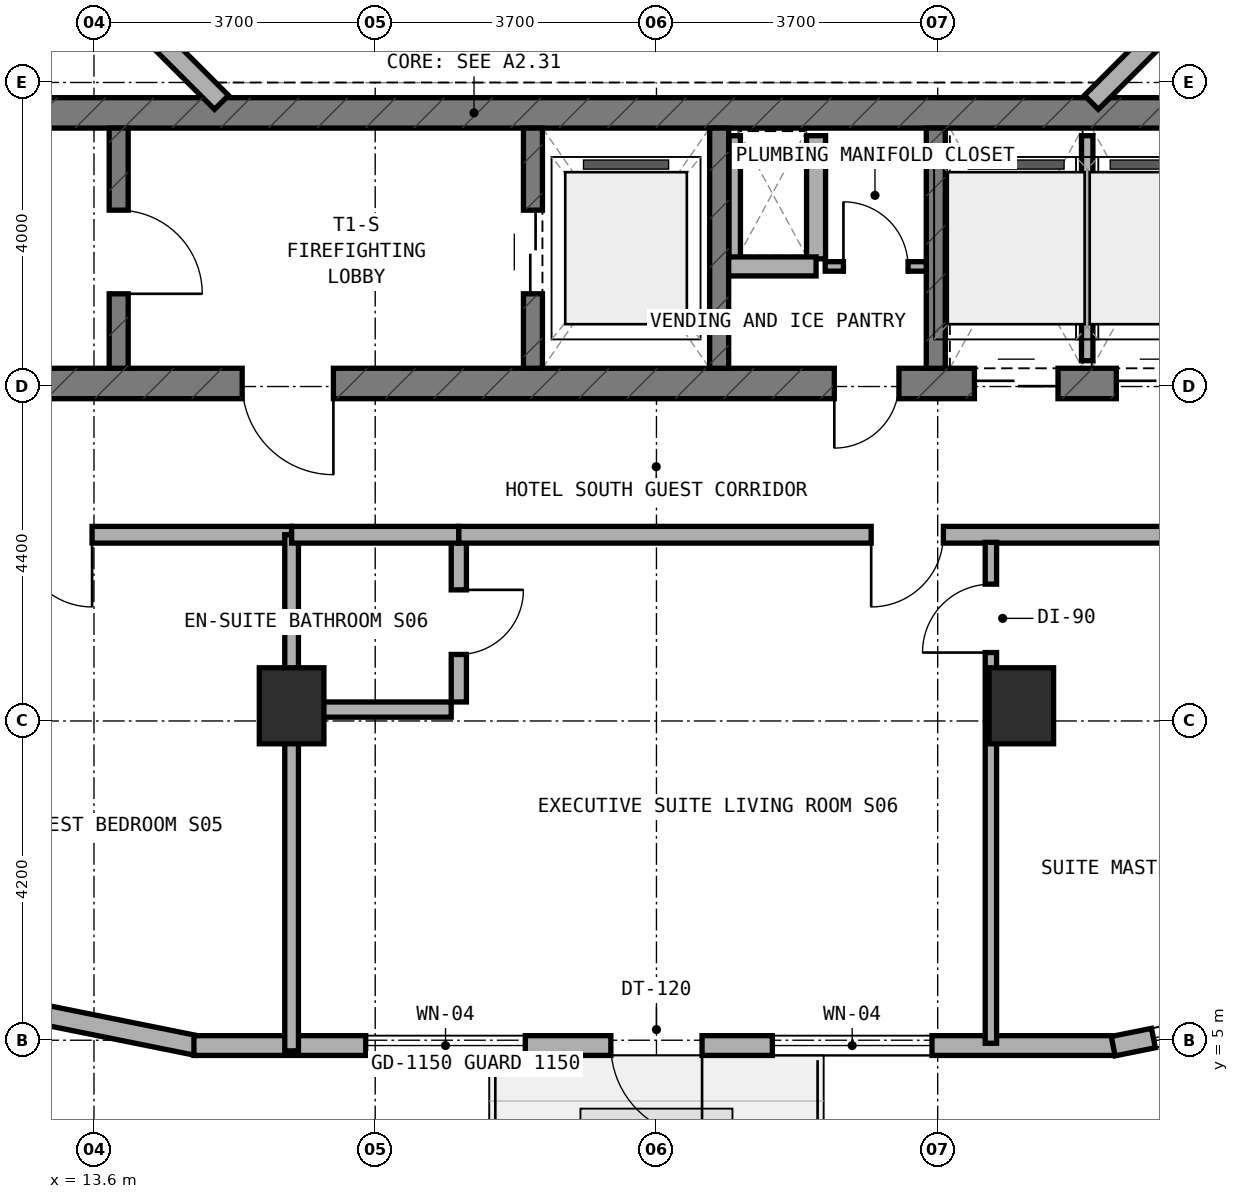
"""IFC4 building model, lengths in metres.
Left out: names, types, materials, properties, quantities, classifications, styles, units other than length and angle.
Written with IfcOpenShell. Run it as: python <this file> out.ifc"""

import sys

from ifc_helpers import new_model, si_unit, direction, frame, frame_2d, origin, origin_2d, place, context, subcontext, project, spatial, rectangle, extrude, element, fill, save


model = new_model("IFC4")
c1 = context("Model", 3, precision=1e-05, world=origin(), true_north=direction((0.0, 1.0)))
c2 = subcontext(c1, "Body", "Model", "MODEL_VIEW")
j1 = project(units=[si_unit("LENGTHUNIT", "METRE"), si_unit("PLANEANGLEUNIT", "RADIAN")], contexts=[c1])
p1 = place(None, origin())
s1 = spatial("IfcSite", under=j1, at=p1, CompositionType="ELEMENT")
p2 = place(p1, origin())
s2 = spatial("IfcBuilding", under=s1, at=p2, CompositionType="ELEMENT")
p3 = place(p2, frame((0.0, 0.0, 134.5)))
s3 = spatial("IfcBuildingStorey", under=s2, at=p3, CompositionType="ELEMENT", Elevation=134.5)
p4 = place(p3, frame((6.4, 13.64, 0.0), z_axis=(0.0, 0.0, 1.0), x_axis=(1.0, 0.0, 0.0)))
e1 = element("IfcWall", 1, at=p4, inside=s3, PredefinedType="SHEAR", context=c2, shape_type="SweptSolid", body=[
    extrude(rectangle(XDim=24.4, YDim=0.4, at=frame_2d((12.2, 0.0))), origin(), (0.0, 0.0, 1.0), 3.5),
])
p5 = place(p4, frame((9.15, 0.0, 0.0)))
e2 = element("IfcOpeningElement", 2, at=p5, cuts=e1, PredefinedType="OPENING", context=c2, shape_type="SweptSolid", body=[
    extrude(rectangle(XDim=1.2, YDim=2.15, at=frame_2d((0.6, 1.075))), frame((0.0, 0.21, 0.0), z_axis=(0.0, -1.0, 0.0), x_axis=(1.0, 0.0, 0.0)), (0.0, 0.0, 1.0), 0.42),
])
p6 = place(p4, frame((16.94, 0.0, 0.0)))
e3 = element("IfcOpeningElement", 3, at=p6, cuts=e1, PredefinedType="OPENING", context=c2, shape_type="SweptSolid", body=[
    extrude(rectangle(XDim=0.85, YDim=2.1, at=frame_2d((0.425, 1.05))), frame((0.0, 0.21, 0.0), z_axis=(0.0, -1.0, 0.0), x_axis=(1.0, 0.0, 0.0)), (0.0, 0.0, 1.0), 0.42),
])
p7 = place(p4, frame((18.783, 0.0, 0.0)))
e4 = element("IfcOpeningElement", 4, at=p7, cuts=e1, PredefinedType="OPENING", context=c2, shape_type="SweptSolid", body=[
    extrude(rectangle(XDim=1.1, YDim=2.15, at=frame_2d((0.55, 1.075))), frame((0.0, 0.21, 0.0), z_axis=(0.0, -1.0, 0.0), x_axis=(1.0, 0.0, 0.0)), (0.0, 0.0, 1.0), 0.42),
])
p8 = place(p4, frame((20.65, 0.0, 0.0)))
e5 = element("IfcOpeningElement", 5, at=p8, cuts=e1, PredefinedType="OPENING", context=c2, shape_type="SweptSolid", body=[
    extrude(rectangle(XDim=1.1, YDim=2.15, at=frame_2d((0.55, 1.075))), frame((0.0, 0.21, 0.0), z_axis=(0.0, -1.0, 0.0), x_axis=(1.0, 0.0, 0.0)), (0.0, 0.0, 1.0), 0.42),
])
p9 = place(p4, frame((22.517, 0.0, 0.0)))
e6 = element("IfcOpeningElement", 6, at=p9, cuts=e1, PredefinedType="OPENING", context=c2, shape_type="SweptSolid", body=[
    extrude(rectangle(XDim=1.1, YDim=2.15, at=frame_2d((0.55, 1.075))), frame((0.0, 0.21, 0.0), z_axis=(0.0, -1.0, 0.0), x_axis=(1.0, 0.0, 0.0)), (0.0, 0.0, 1.0), 0.42),
])
p10 = place(p3, frame((6.4, 17.2, 0.0), z_axis=(0.0, 0.0, 1.0), x_axis=(1.0, 0.0, 0.0)))
e7 = element("IfcWall", 7, at=p10, inside=s3, PredefinedType="SHEAR", context=c2, shape_type="SweptSolid", body=[
    extrude(rectangle(XDim=24.4, YDim=0.4, at=frame_2d((12.2, 0.0))), origin(), (0.0, 0.0, 1.0), 3.5),
])
p11 = place(p3, frame((13.925, 13.84, 0.0), z_axis=(0.0, 0.0, 1.0), x_axis=(0.0, 1.0, 0.0)))
e8 = element("IfcWall", 8, at=p11, inside=s3, PredefinedType="STANDARD", context=c2, shape_type="SweptSolid", body=[
    extrude(rectangle(XDim=3.16, YDim=0.25, at=frame_2d((1.58, 0.0))), origin(), (0.0, 0.0, 1.0), 3.22),
])
p12 = place(p11, frame((0.98, 0.0, 0.0)))
e9 = element("IfcOpeningElement", 9, at=p12, cuts=e8, PredefinedType="OPENING", context=c2, shape_type="SweptSolid", body=[
    extrude(rectangle(XDim=1.1, YDim=2.15, at=frame_2d((0.55, 1.075))), frame((0.0, 0.135, 0.0), z_axis=(0.0, -1.0, 0.0), x_axis=(1.0, 0.0, 0.0)), (0.0, 0.0, 1.0), 0.27),
])
p13 = place(p3, frame((19.375, 13.84, 0.0), z_axis=(0.0, 0.0, 1.0), x_axis=(0.0, 1.0, 0.0)))
e10 = element("IfcWall", 10, at=p13, inside=s3, PredefinedType="STANDARD", context=c2, shape_type="SweptSolid", body=[
    extrude(rectangle(XDim=3.16, YDim=0.25, at=frame_2d((1.58, 0.0))), origin(), (0.0, 0.0, 1.0), 3.22),
])
p14 = place(p13, frame((0.98, 0.0, 0.0)))
e11 = element("IfcOpeningElement", 11, at=p14, cuts=e10, PredefinedType="OPENING", context=c2, shape_type="SweptSolid", body=[
    extrude(rectangle(XDim=1.1, YDim=2.15, at=frame_2d((0.55, 1.075))), frame((0.0, 0.135, 0.0), z_axis=(0.0, -1.0, 0.0), x_axis=(1.0, 0.0, 0.0)), (0.0, 0.0, 1.0), 0.27),
])
for number, where, z_axis, x_axis in (
    (12, (21.825, 13.84, 0.0), (0.0, 0.0, 1.0), (0.0, 1.0, 0.0)),
    (13, (24.675, 13.84, 0.0), (0.0, 0.0, 1.0), (0.0, 1.0, 0.0)),
):
    element("IfcWall", number, at=place(p3, frame(where, z_axis=z_axis, x_axis=x_axis)), inside=s3, PredefinedType="STANDARD", context=c2, shape_type="SweptSolid", body=[
        extrude(rectangle(XDim=3.16, YDim=0.25, at=frame_2d((1.58, 0.0))), origin(), (0.0, 0.0, 1.0), 3.22),
    ])
for number, where, z_axis, x_axis in (
    (14, (16.2, 9.4, 0.0), (0.0, 0.0, 1.0), (1.0, 0.0, 0.0)),
    (15, (25.8, 9.4, 0.0), (0.0, 0.0, 1.0), (1.0, 0.0, 0.0)),
):
    element("IfcColumn", number, at=place(p3, frame(where, z_axis=z_axis, x_axis=x_axis)), inside=s3, PredefinedType="COLUMN", context=c2, shape_type="SweptSolid", body=[
        extrude(rectangle(XDim=0.85, YDim=1.0, at=origin_2d()), origin(), (0.0, 0.0, 1.0), 3.5),
    ])
p15 = place(p3, frame((6.018, 6.729, 0.0), z_axis=(0.0, 0.0, 1.0), x_axis=(0.980317172899, -0.197429077186, 0.0)))
e16 = element("IfcWall", 16, at=p15, inside=s3, PredefinedType="STANDARD", context=c2, shape_type="SweptSolid", body=[
    extrude(rectangle(XDim=9.117, YDim=0.26, at=frame_2d((4.559, 0.0))), origin(), (0.0, 0.0, 1.0), 3.22),
])
p16 = place(p15, frame((4.455, 0.0, 0.85)))
e17 = element("IfcOpeningElement", 17, at=p16, cuts=e16, PredefinedType="OPENING", context=c2, shape_type="SweptSolid", body=[
    extrude(rectangle(XDim=2.1, YDim=1.5, at=frame_2d((1.05, 0.75))), frame((0.0, 0.14, 0.0), z_axis=(0.0, -1.0, 0.0), x_axis=(1.0, 0.0, 0.0)), (0.0, 0.0, 1.0), 0.28),
])
p17 = place(p3, frame((14.915, 4.93, 0.0), z_axis=(0.0, 0.0, 1.0), x_axis=(1.0, 0.0, 0.0)))
e18 = element("IfcWall", 18, at=p17, inside=s3, PredefinedType="STANDARD", context=c2, shape_type="SweptSolid", body=[
    extrude(rectangle(XDim=12.135, YDim=0.26, at=frame_2d((6.067, 0.0))), origin(), (0.0, 0.0, 1.0), 3.22),
])
p18 = place(p17, frame((5.485, 0.0, 0.0)))
e19 = element("IfcOpeningElement", 19, at=p18, cuts=e18, PredefinedType="OPENING", context=c2, shape_type="SweptSolid", body=[
    extrude(rectangle(XDim=1.2, YDim=2.15, at=frame_2d((0.6, 1.075))), frame((0.0, 0.14, 0.0), z_axis=(0.0, -1.0, 0.0), x_axis=(1.0, 0.0, 0.0)), (0.0, 0.0, 1.0), 0.28),
])
p19 = place(p17, frame((2.26, 0.0, 0.85)))
e20 = element("IfcOpeningElement", 20, at=p19, cuts=e18, PredefinedType="OPENING", context=c2, shape_type="SweptSolid", body=[
    extrude(rectangle(XDim=2.1, YDim=1.5, at=frame_2d((1.05, 0.75))), frame((0.0, 0.14, 0.0), z_axis=(0.0, -1.0, 0.0), x_axis=(1.0, 0.0, 0.0)), (0.0, 0.0, 1.0), 0.28),
])
p20 = place(p17, frame((7.61, 0.0, 0.85)))
e21 = element("IfcOpeningElement", 21, at=p20, cuts=e18, PredefinedType="OPENING", context=c2, shape_type="SweptSolid", body=[
    extrude(rectangle(XDim=2.1, YDim=1.5, at=frame_2d((1.05, 0.75))), frame((0.0, 0.14, 0.0), z_axis=(0.0, -1.0, 0.0), x_axis=(1.0, 0.0, 0.0)), (0.0, 0.0, 1.0), 0.28),
])
p21 = place(p3, frame((27.009, 4.922, 0.0), z_axis=(0.0, 0.0, 1.0), x_axis=(0.980321298532, 0.197408590603, 0.0)))
e22 = element("IfcWall", 22, at=p21, inside=s3, PredefinedType="STANDARD", context=c2, shape_type="SweptSolid", body=[
    extrude(rectangle(XDim=9.153, YDim=0.26, at=frame_2d((4.577, 0.0))), origin(), (0.0, 0.0, 1.0), 3.22),
])
p22 = place(p21, frame((0.54, 0.0, 0.85)))
e23 = element("IfcOpeningElement", 23, at=p22, cuts=e22, PredefinedType="OPENING", context=c2, shape_type="SweptSolid", body=[
    extrude(rectangle(XDim=2.1, YDim=1.5, at=frame_2d((1.05, 0.75))), frame((0.0, 0.14, 0.0), z_axis=(0.0, -1.0, 0.0), x_axis=(1.0, 0.0, 0.0)), (0.0, 0.0, 1.0), 0.28),
])
p23 = place(p21, frame((5.216, 0.0, 0.85)))
e24 = element("IfcOpeningElement", 24, at=p23, cuts=e22, PredefinedType="OPENING", context=c2, shape_type="SweptSolid", body=[
    extrude(rectangle(XDim=2.1, YDim=1.5, at=frame_2d((1.05, 0.75))), frame((0.0, 0.14, 0.0), z_axis=(0.0, -1.0, 0.0), x_axis=(1.0, 0.0, 0.0)), (0.0, 0.0, 1.0), 0.28),
])
for number, where, z_axis, x_axis in (
    (25, (26.722, 17.338, 0.0), (0.0, 0.0, 1.0), (0.707, 0.707, 0.0)),
    (26, (13.444, 19.172, 0.0), (0.0, 0.0, 1.0), (0.707, -0.707, 0.0)),
):
    element("IfcWall", number, at=place(p3, frame(where, z_axis=z_axis, x_axis=x_axis)), inside=s3, PredefinedType="STANDARD", context=c2, shape_type="SweptSolid", body=[
        extrude(rectangle(XDim=2.594, YDim=0.26, at=frame_2d((1.297, 0.0))), origin(), (0.0, 0.0, 1.0), 3.22),
    ])
p24 = place(p3, frame((22.03, 15.28, 0.0), z_axis=(0.0, 0.0, 1.0), x_axis=(0.0, 1.0, 0.0)))
e27 = element("IfcWall", 27, at=p24, inside=s3, PredefinedType="PARTITIONING", context=c2, shape_type="SweptSolid", body=[
    extrude(rectangle(XDim=1.62, YDim=0.15, at=frame_2d((0.81, 0.0))), origin(), (0.0, 0.0, 1.0), 3.22),
])
p25 = place(p3, frame((23.1, 15.28, 0.0), z_axis=(0.0, 0.0, 1.0), x_axis=(0.0, 1.0, 0.0)))
e28 = element("IfcWall", 28, at=p25, inside=s3, PredefinedType="SOLIDWALL", context=c2, shape_type="SweptSolid", body=[
    extrude(rectangle(XDim=1.62, YDim=0.25, at=frame_2d((0.81, 0.0))), origin(), (0.0, 0.0, 1.0), 3.22),
])
p26 = place(p3, frame((21.95, 15.18, 0.0), z_axis=(0.0, 0.0, 1.0), x_axis=(1.0, 0.0, 0.0)))
e29 = element("IfcWall", 29, at=p26, inside=s3, PredefinedType="SOLIDWALL", context=c2, shape_type="SweptSolid", body=[
    extrude(rectangle(XDim=1.15, YDim=0.25, at=frame_2d((0.575, 0.0))), origin(), (0.0, 0.0, 1.0), 3.22),
])
p27 = place(p3, frame((23.22, 15.18, 0.0), z_axis=(0.0, 0.0, 1.0), x_axis=(1.0, 0.0, 0.0)))
e30 = element("IfcWall", 30, at=p27, inside=s3, PredefinedType="PARTITIONING", context=c2, shape_type="SweptSolid", body=[
    extrude(rectangle(XDim=1.33, YDim=0.125, at=frame_2d((0.665, 0.0))), origin(), (0.0, 0.0, 1.0), 3.22),
])
p28 = place(p27, frame((0.24, 0.0, 0.0)))
e31 = element("IfcOpeningElement", 31, at=p28, cuts=e30, PredefinedType="OPENING", context=c2, shape_type="SweptSolid", body=[
    extrude(rectangle(XDim=0.85, YDim=2.1, at=frame_2d((0.425, 1.05))), frame((0.0, 0.073, 0.0), z_axis=(0.0, -1.0, 0.0), x_axis=(1.0, 0.0, 0.0)), (0.0, 0.0, 1.0), 0.145),
])
p29 = place(p3, frame((26.667, 13.94, 0.0), z_axis=(0.0, 0.0, 1.0), x_axis=(0.0, 1.0, 0.0)))
e32 = element("IfcWall", 32, at=p29, inside=s3, PredefinedType="PARTITIONING", context=c2, shape_type="SweptSolid", body=[
    extrude(rectangle(XDim=2.96, YDim=0.15, at=frame_2d((1.48, 0.0))), origin(), (0.0, 0.0, 1.0), 3.22),
])
p30 = place(p3, frame((10.0, 11.65, 0.0), z_axis=(0.0, 0.0, 1.0), x_axis=(1.0, 0.0, 0.0)))
e33 = element("IfcWall", 33, at=p30, inside=s3, PredefinedType="SOLIDWALL", context=c2, shape_type="SweptSolid", body=[
    extrude(rectangle(XDim=6.2, YDim=0.22, at=frame_2d((3.1, 0.0))), origin(), (0.0, 0.0, 1.0), 2.695),
])
p31 = place(p30, frame((2.625, 0.0, 0.0)))
e34 = element("IfcOpeningElement", 34, at=p31, cuts=e33, PredefinedType="OPENING", context=c2, shape_type="SweptSolid", body=[
    extrude(rectangle(XDim=0.95, YDim=2.1, at=frame_2d((0.475, 1.05))), frame((0.0, 0.12, 0.0), z_axis=(0.0, -1.0, 0.0), x_axis=(1.0, 0.0, 0.0)), (0.0, 0.0, 1.0), 0.24),
])
p32 = place(p3, frame((16.2, 4.86, 0.0), z_axis=(0.0, 0.0, 1.0), x_axis=(0.0, 1.0, 0.0)))
e35 = element("IfcWall", 35, at=p32, inside=s3, PredefinedType="SOLIDWALL", context=c2, shape_type="SweptSolid", body=[
    extrude(rectangle(XDim=6.79, YDim=0.18, at=frame_2d((3.395, 0.0))), origin(), (0.0, 0.0, 1.0), 2.695),
])
p33 = place(p3, frame((18.4, 9.45, 0.0), z_axis=(0.0, 0.0, 1.0), x_axis=(0.0, 1.0, 0.0)))
e36 = element("IfcWall", 36, at=p33, inside=s3, PredefinedType="PLUMBINGWALL", context=c2, shape_type="SweptSolid", body=[
    extrude(rectangle(XDim=2.1, YDim=0.2, at=frame_2d((1.05, 0.0))), origin(), (0.0, 0.0, 1.0), 2.835),
])
p34 = place(p33, frame((0.625, 0.0, 0.0)))
e37 = element("IfcOpeningElement", 37, at=p34, cuts=e36, PredefinedType="OPENING", context=c2, shape_type="SweptSolid", body=[
    extrude(rectangle(XDim=0.85, YDim=2.1, at=frame_2d((0.425, 1.05))), frame((0.0, 0.11, 0.0), z_axis=(0.0, -1.0, 0.0), x_axis=(1.0, 0.0, 0.0)), (0.0, 0.0, 1.0), 0.22),
])
p35 = place(p3, frame((16.3, 9.35, 0.0), z_axis=(0.0, 0.0, 1.0), x_axis=(1.0, 0.0, 0.0)))
e38 = element("IfcWall", 38, at=p35, inside=s3, PredefinedType="PLUMBINGWALL", context=c2, shape_type="SweptSolid", body=[
    extrude(rectangle(XDim=2.0, YDim=0.2, at=frame_2d((1.0, 0.0))), origin(), (0.0, 0.0, 1.0), 2.835),
])
p36 = place(p3, frame((16.2, 11.65, 0.0), z_axis=(0.0, 0.0, 1.0), x_axis=(1.0, 0.0, 0.0)))
e39 = element("IfcWall", 39, at=p36, inside=s3, PredefinedType="SOLIDWALL", context=c2, shape_type="SweptSolid", body=[
    extrude(rectangle(XDim=2.2, YDim=0.22, at=frame_2d((1.1, 0.0))), origin(), (0.0, 0.0, 1.0), 2.695),
])
p37 = place(p3, frame((18.4, 11.65, 0.0), z_axis=(0.0, 0.0, 1.0), x_axis=(1.0, 0.0, 0.0)))
e40 = element("IfcWall", 40, at=p37, inside=s3, PredefinedType="SOLIDWALL", context=c2, shape_type="SweptSolid", body=[
    extrude(rectangle(XDim=11.8, YDim=0.22, at=frame_2d((5.9, 0.0))), origin(), (0.0, 0.0, 1.0), 2.695),
])
p38 = place(p37, frame((5.425, 0.0, 0.0)))
e41 = element("IfcOpeningElement", 41, at=p38, cuts=e40, PredefinedType="OPENING", context=c2, shape_type="SweptSolid", body=[
    extrude(rectangle(XDim=0.95, YDim=2.1, at=frame_2d((0.475, 1.05))), frame((0.0, 0.12, 0.0), z_axis=(0.0, -1.0, 0.0), x_axis=(1.0, 0.0, 0.0)), (0.0, 0.0, 1.0), 0.24),
])
p39 = place(p3, frame((25.4, 4.96, 0.0), z_axis=(0.0, 0.0, 1.0), x_axis=(0.0, 1.0, 0.0)))
e42 = element("IfcWall", 42, at=p39, inside=s3, PredefinedType="PARTITIONING", context=c2, shape_type="SweptSolid", body=[
    extrude(rectangle(XDim=6.59, YDim=0.15, at=frame_2d((3.295, 0.0))), origin(), (0.0, 0.0, 1.0), 2.835),
])
p40 = place(p39, frame((5.14, 0.0, 0.0)))
e43 = element("IfcOpeningElement", 43, at=p40, cuts=e42, PredefinedType="OPENING", context=c2, shape_type="SweptSolid", body=[
    extrude(rectangle(XDim=0.9, YDim=2.1, at=frame_2d((0.45, 1.05))), frame((0.0, 0.085, 0.0), z_axis=(0.0, -1.0, 0.0), x_axis=(1.0, 0.0, 0.0)), (0.0, 0.0, 1.0), 0.17),
])
p41 = place(p18, frame((1.2, 0.0, 0.0), z_axis=(0.0, 0.0, 1.0), x_axis=(-1.0, 0.0, 0.0)))
e44 = element("IfcDoor", 44, at=p41, inside=s3, OperationType="SINGLE_SWING_LEFT", PredefinedType="DOOR", context=c2, shape_type="SweptSolid", body=[
    extrude(rectangle(XDim=1.2, YDim=2.15, at=frame_2d((0.6, 1.075))), frame((0.0, 0.025, 0.0), z_axis=(0.0, -1.0, 0.0), x_axis=(1.0, 0.0, 0.0)), (0.0, 0.0, 1.0), 0.05),
])
fill(e19, e44)
p42 = place(p19, origin())
e45 = element("IfcWindow", 45, at=p42, inside=s3, PartitioningType="SINGLE_PANEL", PredefinedType="WINDOW", context=c2, shape_type="SweptSolid", body=[
    extrude(rectangle(XDim=2.1, YDim=1.5, at=frame_2d((1.05, 0.75))), frame((0.0, 0.03, 0.0), z_axis=(0.0, -1.0, 0.0), x_axis=(1.0, 0.0, 0.0)), (0.0, 0.0, 1.0), 0.06),
])
fill(e20, e45)
p43 = place(p20, origin())
e46 = element("IfcWindow", 46, at=p43, inside=s3, PartitioningType="SINGLE_PANEL", PredefinedType="WINDOW", context=c2, shape_type="SweptSolid", body=[
    extrude(rectangle(XDim=2.1, YDim=1.5, at=frame_2d((1.05, 0.75))), frame((0.0, 0.03, 0.0), z_axis=(0.0, -1.0, 0.0), x_axis=(1.0, 0.0, 0.0)), (0.0, 0.0, 1.0), 0.06),
])
fill(e21, e46)
p44 = place(p22, origin())
e47 = element("IfcWindow", 47, at=p44, inside=s3, PartitioningType="SINGLE_PANEL", PredefinedType="WINDOW", context=c2, shape_type="SweptSolid", body=[
    extrude(rectangle(XDim=2.1, YDim=1.5, at=frame_2d((1.05, 0.75))), frame((0.0, 0.03, 0.0), z_axis=(0.0, -1.0, 0.0), x_axis=(1.0, 0.0, 0.0)), (0.0, 0.0, 1.0), 0.06),
])
fill(e23, e47)
p45 = place(p12, frame((1.1, 0.0, 0.0), z_axis=(0.0, 0.0, 1.0), x_axis=(-1.0, 0.0, 0.0)))
e48 = element("IfcDoor", 48, at=p45, inside=s3, OperationType="SINGLE_SWING_RIGHT", PredefinedType="DOOR", context=c2, shape_type="SweptSolid", body=[
    extrude(rectangle(XDim=1.1, YDim=2.15, at=frame_2d((0.55, 1.075))), frame((0.0, 0.025, 0.0), z_axis=(0.0, -1.0, 0.0), x_axis=(1.0, 0.0, 0.0)), (0.0, 0.0, 1.0), 0.05),
])
fill(e9, e48)
p46 = place(p5, frame((1.2, 0.0, 0.0), z_axis=(0.0, 0.0, 1.0), x_axis=(-1.0, 0.0, 0.0)))
e49 = element("IfcDoor", 49, at=p46, inside=s3, OperationType="SINGLE_SWING_LEFT", PredefinedType="DOOR", context=c2, shape_type="SweptSolid", body=[
    extrude(rectangle(XDim=1.2, YDim=2.15, at=frame_2d((0.6, 1.075))), frame((0.0, 0.025, 0.0), z_axis=(0.0, -1.0, 0.0), x_axis=(1.0, 0.0, 0.0)), (0.0, 0.0, 1.0), 0.05),
])
fill(e2, e49)
p47 = place(p14, origin())
e50 = element("IfcDoor", 50, at=p47, inside=s3, OperationType="DOUBLE_DOOR_SLIDING", PredefinedType="DOOR", context=c2, shape_type="SweptSolid", body=[
    extrude(rectangle(XDim=1.1, YDim=2.15, at=frame_2d((0.55, 1.075))), frame((0.0, 0.025, 0.0), z_axis=(0.0, -1.0, 0.0), x_axis=(1.0, 0.0, 0.0)), (0.0, 0.0, 1.0), 0.05),
])
fill(e11, e50)
p48 = place(p6, frame((0.85, 0.0, 0.0), z_axis=(0.0, 0.0, 1.0), x_axis=(-1.0, 0.0, 0.0)))
e51 = element("IfcDoor", 51, at=p48, inside=s3, OperationType="SINGLE_SWING_RIGHT", PredefinedType="DOOR", context=c2, shape_type="SweptSolid", body=[
    extrude(rectangle(XDim=0.85, YDim=2.1, at=frame_2d((0.425, 1.05))), frame((0.0, 0.025, 0.0), z_axis=(0.0, -1.0, 0.0), x_axis=(1.0, 0.0, 0.0)), (0.0, 0.0, 1.0), 0.05),
])
fill(e3, e51)
p49 = place(p7, frame((1.1, 0.0, 0.0), z_axis=(0.0, 0.0, 1.0), x_axis=(-1.0, 0.0, 0.0)))
e52 = element("IfcDoor", 52, at=p49, inside=s3, OperationType="DOUBLE_DOOR_SLIDING", PredefinedType="DOOR", context=c2, shape_type="SweptSolid", body=[
    extrude(rectangle(XDim=1.1, YDim=2.15, at=frame_2d((0.55, 1.075))), frame((0.0, 0.025, 0.0), z_axis=(0.0, -1.0, 0.0), x_axis=(1.0, 0.0, 0.0)), (0.0, 0.0, 1.0), 0.05),
])
fill(e4, e52)
p50 = place(p8, frame((1.1, 0.0, 0.0), z_axis=(0.0, 0.0, 1.0), x_axis=(-1.0, 0.0, 0.0)))
e53 = element("IfcDoor", 53, at=p50, inside=s3, OperationType="DOUBLE_DOOR_SLIDING", PredefinedType="DOOR", context=c2, shape_type="SweptSolid", body=[
    extrude(rectangle(XDim=1.1, YDim=2.15, at=frame_2d((0.55, 1.075))), frame((0.0, 0.025, 0.0), z_axis=(0.0, -1.0, 0.0), x_axis=(1.0, 0.0, 0.0)), (0.0, 0.0, 1.0), 0.05),
])
fill(e5, e53)
p51 = place(p28, origin())
e54 = element("IfcDoor", 54, at=p51, inside=s3, OperationType="SINGLE_SWING_LEFT", PredefinedType="DOOR", context=c2, shape_type="SweptSolid", body=[
    extrude(rectangle(XDim=0.85, YDim=2.1, at=frame_2d((0.425, 1.05))), frame((0.0, 0.025, 0.0), z_axis=(0.0, -1.0, 0.0), x_axis=(1.0, 0.0, 0.0)), (0.0, 0.0, 1.0), 0.05),
])
fill(e31, e54)
p52 = place(p31, frame((0.95, 0.0, 0.0), z_axis=(0.0, 0.0, 1.0), x_axis=(-1.0, 0.0, 0.0)))
e55 = element("IfcDoor", 55, at=p52, inside=s3, OperationType="SINGLE_SWING_LEFT", PredefinedType="DOOR", context=c2, shape_type="SweptSolid", body=[
    extrude(rectangle(XDim=0.95, YDim=2.1, at=frame_2d((0.475, 1.05))), frame((0.0, 0.025, 0.0), z_axis=(0.0, -1.0, 0.0), x_axis=(1.0, 0.0, 0.0)), (0.0, 0.0, 1.0), 0.05),
])
fill(e34, e55)
p53 = place(p34, frame((0.85, 0.0, 0.0), z_axis=(0.0, 0.0, 1.0), x_axis=(-1.0, 0.0, 0.0)))
e56 = element("IfcDoor", 56, at=p53, inside=s3, OperationType="SINGLE_SWING_LEFT", PredefinedType="DOOR", context=c2, shape_type="SweptSolid", body=[
    extrude(rectangle(XDim=0.85, YDim=2.1, at=frame_2d((0.425, 1.05))), frame((0.0, 0.025, 0.0), z_axis=(0.0, -1.0, 0.0), x_axis=(1.0, 0.0, 0.0)), (0.0, 0.0, 1.0), 0.05),
])
fill(e37, e56)
p54 = place(p38, frame((0.95, 0.0, 0.0), z_axis=(0.0, 0.0, 1.0), x_axis=(-1.0, 0.0, 0.0)))
e57 = element("IfcDoor", 57, at=p54, inside=s3, OperationType="SINGLE_SWING_RIGHT", PredefinedType="DOOR", context=c2, shape_type="SweptSolid", body=[
    extrude(rectangle(XDim=0.95, YDim=2.1, at=frame_2d((0.475, 1.05))), frame((0.0, 0.025, 0.0), z_axis=(0.0, -1.0, 0.0), x_axis=(1.0, 0.0, 0.0)), (0.0, 0.0, 1.0), 0.05),
])
fill(e41, e57)
p55 = place(p40, origin())
e58 = element("IfcDoor", 58, at=p55, inside=s3, OperationType="SINGLE_SWING_LEFT", PredefinedType="DOOR", context=c2, shape_type="SweptSolid", body=[
    extrude(rectangle(XDim=0.9, YDim=2.1, at=frame_2d((0.45, 1.05))), frame((0.0, 0.025, 0.0), z_axis=(0.0, -1.0, 0.0), x_axis=(1.0, 0.0, 0.0)), (0.0, 0.0, 1.0), 0.05),
])
fill(e43, e58)
save(model, sys.argv[1])
